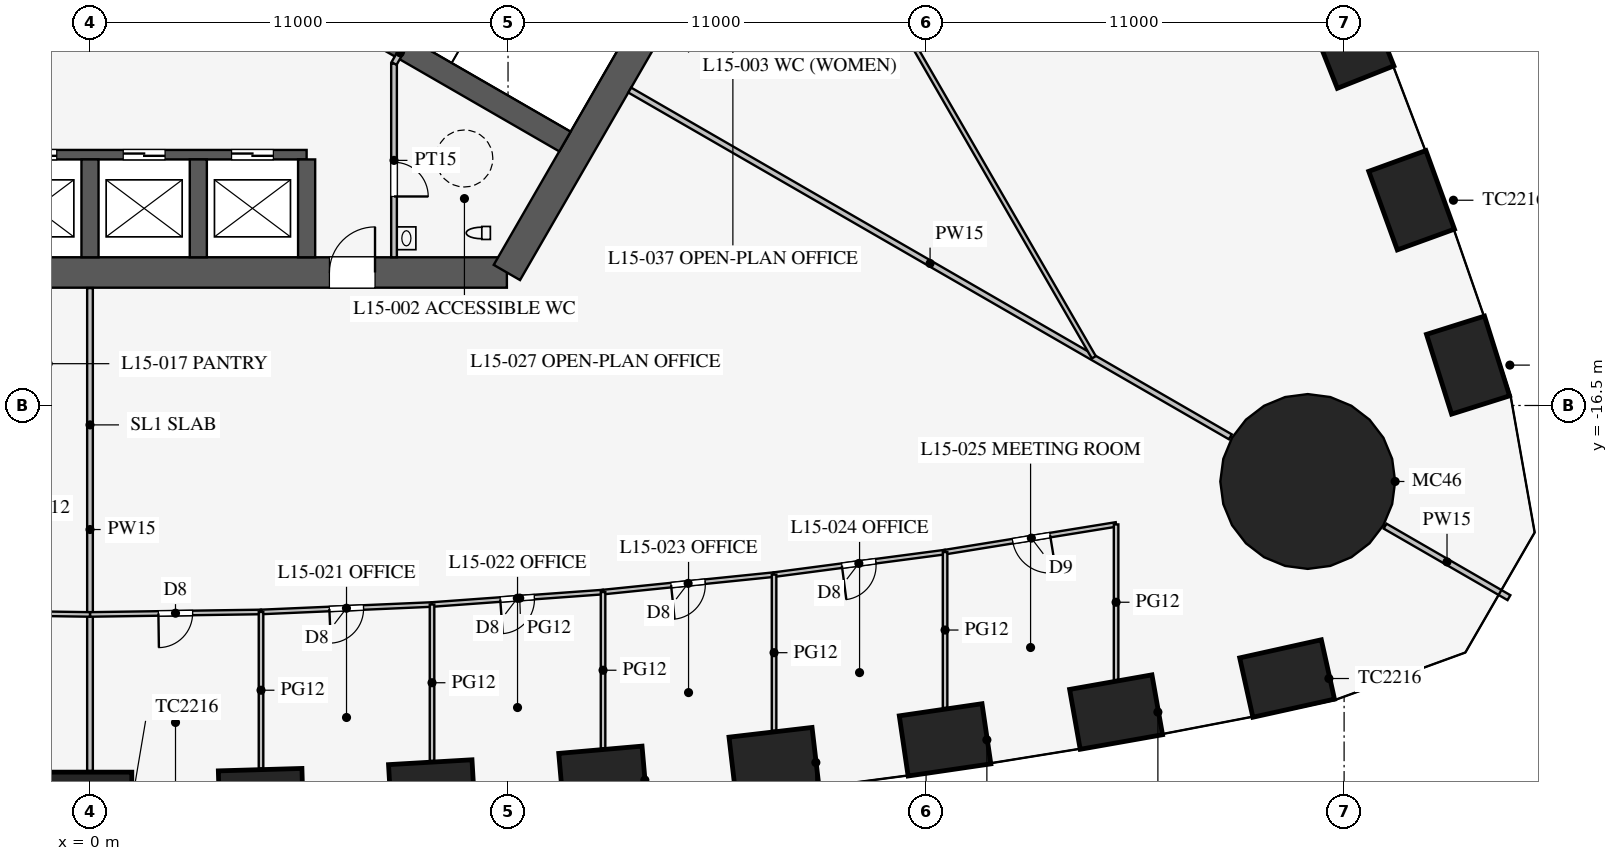
"""IFC4 building model, lengths in metres.
Left out: names, types, materials, properties, quantities, classifications, styles, units other than length and angle.
Written with IfcOpenShell. Run it as: python <this file> out.ifc"""

import sys

from ifc_helpers import new_model, si_unit, direction, frame, frame_2d, origin, origin_2d, place, context, subcontext, project, spatial, rectangle, circle, extrude, element, fill, save


model = new_model("IFC4")
c1 = context("Model", 3, precision=1e-05, world=origin(), true_north=direction((0.0, 1.0)))
c2 = subcontext(c1, "Body", "Model", "MODEL_VIEW")
j1 = project(units=[si_unit("LENGTHUNIT", "METRE"), si_unit("PLANEANGLEUNIT", "RADIAN")], contexts=[c1])
p1 = place(None, origin())
s1 = spatial("IfcSite", under=j1, at=p1, CompositionType="ELEMENT")
p2 = place(p1, origin())
s2 = spatial("IfcBuilding", under=s1, at=p2, CompositionType="ELEMENT")
p3 = place(p2, frame((0.0, 0.0, 66.9)))
s3 = spatial("IfcBuildingStorey", under=s2, at=p3, CompositionType="ELEMENT", Elevation=66.9)
for number, where, z_axis, x_axis in (
    (1, (0.0, -26.949, 0.0), (0.0, 0.0, 1.0), (1.0, 0.0, 0.0)),
    (2, (4.5, -26.883, 0.0), (0.0, 0.0, 1.0), (1.0, 0.029, 0.0)),
    (3, (9.0, -26.686, 0.0), (0.0, 0.0, 1.0), (0.998, 0.058, 0.0)),
    (4, (13.5, -26.357, 0.0), (0.0, 0.0, 1.0), (0.996, 0.087, 0.0)),
    (5, (18.0, -25.895, 0.0), (0.0, 0.0, 1.0), (0.993, 0.116, 0.0)),
    (6, (22.5, -25.299, 0.0), (0.0, 0.0, 1.0), (0.989, 0.145, 0.0)),
    (7, (27.0, -24.568, 0.0), (0.0, 0.0, 1.0), (0.985, 0.174, 0.0)),
    (8, (31.5, -23.685, 0.0), (0.0, 0.0, 1.0), (0.976, 0.217, 0.0)),
    (9, (36.262, -15.438, 0.0), (0.0, 0.0, 1.0), (-0.3, 0.954, 0.0)),
    (10, (34.776, -11.099, 0.0), (0.0, 0.0, 1.0), (-0.342, 0.94, 0.0)),
    (11, (33.16, -6.836, 0.0), (0.0, 0.0, 1.0), (-0.369, 0.929, 0.0)),
):
    element("IfcColumn", number, at=place(p3, frame(where, z_axis=z_axis, x_axis=x_axis)), inside=s3, PredefinedType="COLUMN", context=c2, shape_type="SweptSolid", body=[
        extrude(rectangle(XDim=2.2, YDim=1.6, at=origin_2d()), origin(), (0.0, 0.0, 1.0), 4.2),
    ])
p4 = place(p3, frame((32.043, -18.5, 0.0), z_axis=(0.0, 0.0, 1.0), x_axis=(1.0, 0.0, 0.0)))
e12 = element("IfcColumn", 12, at=p4, inside=s3, PredefinedType="COLUMN", context=c2, shape_type="SweptSolid", body=[
    extrude(circle(Radius=2.3, at=origin_2d()), origin(), (0.0, 0.0, 1.0), 4.2),
])
p5 = place(p3, frame((-10.97, -13.0, 0.0), z_axis=(0.0, 0.0, 1.0), x_axis=(1.0, 0.0, 0.0)))
e13 = element("IfcWall", 13, at=p5, inside=s3, PredefinedType="SHEAR", context=c2, shape_type="SweptSolid", body=[
    extrude(rectangle(XDim=21.939, YDim=0.8, at=frame_2d((10.97, 0.0))), origin(), (0.0, 0.0, 1.0), 4.2),
])
p6 = place(p5, frame((17.27, 0.0, 0.0)))
e14 = element("IfcOpeningElement", 14, at=p6, cuts=e13, PredefinedType="OPENING", context=c2, shape_type="SweptSolid", body=[
    extrude(rectangle(XDim=1.2, YDim=2.1, at=frame_2d((0.6, 1.05))), frame((0.0, 0.41, 0.0), z_axis=(0.0, -1.0, 0.0), x_axis=(1.0, 0.0, 0.0)), (0.0, 0.0, 1.0), 0.82),
])
p7 = place(p5, frame((3.47, 0.0, 0.0)))
e15 = element("IfcOpeningElement", 15, at=p7, cuts=e13, PredefinedType="OPENING", context=c2, shape_type="SweptSolid", body=[
    extrude(rectangle(XDim=1.2, YDim=2.1, at=frame_2d((0.6, 1.05))), frame((0.0, 0.41, 0.0), z_axis=(0.0, -1.0, 0.0), x_axis=(1.0, 0.0, 0.0)), (0.0, 0.0, 1.0), 0.82),
])
p8 = place(p3, frame((10.97, -13.0, 0.0), z_axis=(0.0, 0.0, 1.0), x_axis=(0.499995765644, 0.866027848477, 0.0)))
e16 = element("IfcWall", 16, at=p8, inside=s3, PredefinedType="SHEAR", context=c2, shape_type="SweptSolid", body=[
    extrude(rectangle(XDim=11.547, YDim=0.8, at=frame_2d((5.773, 0.0))), origin(), (0.0, 0.0, 1.0), 4.2),
])
p9 = place(p3, frame((-5.7, -9.9, 0.0), z_axis=(0.0, 0.0, 1.0), x_axis=(1.0, 0.0, 0.0)))
e17 = element("IfcWall", 17, at=p9, inside=s3, PredefinedType="SHEAR", context=c2, shape_type="SweptSolid", body=[
    extrude(rectangle(XDim=11.4, YDim=0.25, at=frame_2d((5.7, 0.0))), origin(), (0.0, 0.0, 1.0), 4.2),
])
p10 = place(p9, frame((0.875, 0.0, 0.0)))
e18 = element("IfcOpeningElement", 18, at=p10, cuts=e17, PredefinedType="OPENING", context=c2, shape_type="SweptSolid", body=[
    extrude(rectangle(XDim=1.1, YDim=2.2, at=frame_2d((0.55, 1.1))), frame((0.0, 0.135, 0.0), z_axis=(0.0, -1.0, 0.0), x_axis=(1.0, 0.0, 0.0)), (0.0, 0.0, 1.0), 0.27),
])
p11 = place(p9, frame((3.725, 0.0, 0.0)))
e19 = element("IfcOpeningElement", 19, at=p11, cuts=e17, PredefinedType="OPENING", context=c2, shape_type="SweptSolid", body=[
    extrude(rectangle(XDim=1.1, YDim=2.2, at=frame_2d((0.55, 1.1))), frame((0.0, 0.135, 0.0), z_axis=(0.0, -1.0, 0.0), x_axis=(1.0, 0.0, 0.0)), (0.0, 0.0, 1.0), 0.27),
])
p12 = place(p9, frame((6.575, 0.0, 0.0)))
e20 = element("IfcOpeningElement", 20, at=p12, cuts=e17, PredefinedType="OPENING", context=c2, shape_type="SweptSolid", body=[
    extrude(rectangle(XDim=1.1, YDim=2.2, at=frame_2d((0.55, 1.1))), frame((0.0, 0.135, 0.0), z_axis=(0.0, -1.0, 0.0), x_axis=(1.0, 0.0, 0.0)), (0.0, 0.0, 1.0), 0.27),
])
p13 = place(p9, frame((9.425, 0.0, 0.0)))
e21 = element("IfcOpeningElement", 21, at=p13, cuts=e17, PredefinedType="OPENING", context=c2, shape_type="SweptSolid", body=[
    extrude(rectangle(XDim=1.1, YDim=2.2, at=frame_2d((0.55, 1.1))), frame((0.0, 0.135, 0.0), z_axis=(0.0, -1.0, 0.0), x_axis=(1.0, 0.0, 0.0)), (0.0, 0.0, 1.0), 0.27),
])
for number, where, z_axis, x_axis in (
    (22, (0.0, -10.025, 0.0), (0.0, 0.0, 1.0), (0.0, -1.0, 0.0)),
    (23, (2.85, -10.025, 0.0), (0.0, 0.0, 1.0), (0.0, -1.0, 0.0)),
    (24, (5.7, -10.025, 0.0), (0.0, 0.0, 1.0), (0.0, -1.0, 0.0)),
):
    element("IfcWall", number, at=place(p3, frame(where, z_axis=z_axis, x_axis=x_axis)), inside=s3, PredefinedType="SHEAR", context=c2, shape_type="SweptSolid", body=[
        extrude(rectangle(XDim=2.575, YDim=0.45, at=frame_2d((1.288, 0.0))), origin(), (0.0, 0.0, 1.0), 4.2),
    ])
p14 = place(p3, frame((4.638, -5.016, 0.0), z_axis=(0.0, 0.0, 1.0), x_axis=(0.866019375473, -0.500010441196, 0.0)))
e25 = element("IfcWall", 25, at=p14, inside=s3, PredefinedType="SHEAR", context=c2, shape_type="SweptSolid", body=[
    extrude(rectangle(XDim=9.075, YDim=0.6, at=frame_2d((4.538, 0.0))), origin(), (0.0, 0.0, 1.0), 4.2),
])
p15 = place(p3, frame((8.0, -7.5, 0.0), z_axis=(0.0, 0.0, 1.0), x_axis=(0.0, -1.0, 0.0)))
e26 = element("IfcWall", 26, at=p15, inside=s3, PredefinedType="PARTITIONING", context=c2, shape_type="SweptSolid", body=[
    extrude(rectangle(XDim=5.1, YDim=0.15, at=frame_2d((2.55, 0.0))), origin(), (0.0, 0.0, 1.0), 4.0),
])
p16 = place(p15, frame((2.6, 0.0, 0.0)))
e27 = element("IfcOpeningElement", 27, at=p16, cuts=e26, PredefinedType="OPENING", context=c2, shape_type="SweptSolid", body=[
    extrude(rectangle(XDim=0.9, YDim=2.1, at=frame_2d((0.45, 1.05))), frame((0.0, 0.085, 0.0), z_axis=(0.0, -1.0, 0.0), x_axis=(1.0, 0.0, 0.0)), (0.0, 0.0, 1.0), 0.17),
])
p17 = place(p3, frame((8.0, -7.5, 0.0), z_axis=(0.0, 0.0, 1.0), x_axis=(0.499842556608, 0.866116284689, 0.0)))
e28 = element("IfcWall", 28, at=p17, inside=s3, PredefinedType="PARTITIONING", context=c2, shape_type="SweptSolid", body=[
    extrude(rectangle(XDim=0.645, YDim=0.15, at=frame_2d((0.323, 0.0))), origin(), (0.0, 0.0, 1.0), 4.0),
])
p18 = place(p3, frame((14.203, -8.2, 0.0), z_axis=(0.0, 0.0, 1.0), x_axis=(0.866024965723, -0.500000758745, 0.0)))
e29 = element("IfcWall", 29, at=p18, inside=s3, PredefinedType="PARTITIONING", context=c2, shape_type="SweptSolid", body=[
    extrude(rectangle(XDim=18.25, YDim=0.15, at=frame_2d((9.125, 0.0))), origin(), (0.0, 0.0, 1.0), 2.3),
])
p19 = place(p3, frame((34.078, -19.675, 0.0), z_axis=(0.0, 0.0, 1.0), x_axis=(0.866019247219, -0.500010663332, 0.0)))
e30 = element("IfcWall", 30, at=p19, inside=s3, PredefinedType="PARTITIONING", context=c2, shape_type="SweptSolid", body=[
    extrude(rectangle(XDim=3.764, YDim=0.15, at=frame_2d((1.882, 0.0))), origin(), (0.0, 0.0, 1.0), 2.3),
])
p20 = place(p3, frame((0.0, -13.41, 0.0), z_axis=(0.0, 0.0, 1.0), x_axis=(0.0, -1.0, 0.0)))
e31 = element("IfcWall", 31, at=p20, inside=s3, PredefinedType="PARTITIONING", context=c2, shape_type="SweptSolid", body=[
    extrude(rectangle(XDim=12.709, YDim=0.15, at=frame_2d((6.354, 0.0))), origin(), (0.0, 0.0, 1.0), 2.8),
])
p21 = place(p3, frame((0.0, -21.999, 0.0), z_axis=(0.0, 0.0, 1.0), x_axis=(0.999894311967, 0.014538393859, 0.0)))
e32 = element("IfcWall", 32, at=p21, inside=s3, PredefinedType="PARTITIONING", context=c2, shape_type="SweptSolid", body=[
    extrude(rectangle(XDim=4.5, YDim=0.12, at=frame_2d((2.25, 0.0))), origin(), (0.0, 0.0, 1.0), 2.9),
])
p22 = place(p21, frame((1.8, 0.0, 0.15)))
e33 = element("IfcOpeningElement", 33, at=p22, cuts=e32, PredefinedType="OPENING", context=c2, shape_type="SweptSolid", body=[
    extrude(rectangle(XDim=0.9, YDim=2.1, at=frame_2d((0.45, 1.05))), frame((0.0, 0.07, 0.0), z_axis=(0.0, -1.0, 0.0), x_axis=(1.0, 0.0, 0.0)), (0.0, 0.0, 1.0), 0.14),
])
p23 = place(p3, frame((13.5, -21.41, 0.0), z_axis=(0.0, 0.0, 1.0), x_axis=(0.994833141332, 0.101523499286, 0.0)))
e34 = element("IfcWall", 34, at=p23, inside=s3, PredefinedType="PARTITIONING", context=c2, shape_type="SweptSolid", body=[
    extrude(rectangle(XDim=4.523, YDim=0.12, at=frame_2d((2.262, 0.0))), origin(), (0.0, 0.0, 1.0), 2.9),
])
p24 = place(p23, frame((1.8, 0.0, 0.15)))
e35 = element("IfcOpeningElement", 35, at=p24, cuts=e34, PredefinedType="OPENING", context=c2, shape_type="SweptSolid", body=[
    extrude(rectangle(XDim=0.9, YDim=2.1, at=frame_2d((0.45, 1.05))), frame((0.0, 0.07, 0.0), z_axis=(0.0, -1.0, 0.0), x_axis=(1.0, 0.0, 0.0)), (0.0, 0.0, 1.0), 0.14),
])
p25 = place(p3, frame((18.0, -20.951, 0.0), z_axis=(0.0, 0.0, 1.0), x_axis=(0.991435244698, 0.130599217346, 0.0)))
e36 = element("IfcWall", 36, at=p25, inside=s3, PredefinedType="PARTITIONING", context=c2, shape_type="SweptSolid", body=[
    extrude(rectangle(XDim=4.539, YDim=0.12, at=frame_2d((2.27, 0.0))), origin(), (0.0, 0.0, 1.0), 2.9),
])
p26 = place(p25, frame((1.8, 0.0, 0.15)))
e37 = element("IfcOpeningElement", 37, at=p26, cuts=e36, PredefinedType="OPENING", context=c2, shape_type="SweptSolid", body=[
    extrude(rectangle(XDim=0.9, YDim=2.1, at=frame_2d((0.45, 1.05))), frame((0.0, 0.07, 0.0), z_axis=(0.0, -1.0, 0.0), x_axis=(1.0, 0.0, 0.0)), (0.0, 0.0, 1.0), 0.14),
])
p27 = place(p3, frame((22.5, -20.358, 0.0), z_axis=(0.0, 0.0, 1.0), x_axis=(0.987181300889, 0.159602879593, 0.0)))
e38 = element("IfcWall", 38, at=p27, inside=s3, PredefinedType="PARTITIONING", context=c2, shape_type="SweptSolid", body=[
    extrude(rectangle(XDim=4.558, YDim=0.12, at=frame_2d((2.279, 0.0))), origin(), (0.0, 0.0, 1.0), 2.9),
])
p28 = place(p27, frame((1.8, 0.0, 0.15)))
e39 = element("IfcOpeningElement", 39, at=p28, cuts=e38, PredefinedType="OPENING", context=c2, shape_type="SweptSolid", body=[
    extrude(rectangle(XDim=1.0, YDim=2.1, at=frame_2d((0.5, 1.05))), frame((0.0, 0.07, 0.0), z_axis=(0.0, -1.0, 0.0), x_axis=(1.0, 0.0, 0.0)), (0.0, 0.0, 1.0), 0.14),
])
p29 = place(p3, frame((4.5, -21.933, 0.0), z_axis=(0.0, 0.0, 1.0), x_axis=(0.999052370647, 0.043524254212, 0.0)))
e40 = element("IfcWall", 40, at=p29, inside=s3, PredefinedType="PARTITIONING", context=c2, shape_type="SweptSolid", body=[
    extrude(rectangle(XDim=4.504, YDim=0.12, at=frame_2d((2.252, 0.0))), origin(), (0.0, 0.0, 1.0), 2.9),
])
p30 = place(p29, frame((1.8, 0.0, 0.15)))
e41 = element("IfcOpeningElement", 41, at=p30, cuts=e40, PredefinedType="OPENING", context=c2, shape_type="SweptSolid", body=[
    extrude(rectangle(XDim=0.9, YDim=2.1, at=frame_2d((0.45, 1.05))), frame((0.0, 0.07, 0.0), z_axis=(0.0, -1.0, 0.0), x_axis=(1.0, 0.0, 0.0)), (0.0, 0.0, 1.0), 0.14),
])
p31 = place(p3, frame((9.0, -21.737, 0.0), z_axis=(0.0, 0.0, 1.0), x_axis=(0.997363894896, 0.072562119306, 0.0)))
e42 = element("IfcWall", 42, at=p31, inside=s3, PredefinedType="PARTITIONING", context=c2, shape_type="SweptSolid", body=[
    extrude(rectangle(XDim=4.512, YDim=0.12, at=frame_2d((2.256, 0.0))), origin(), (0.0, 0.0, 1.0), 2.9),
])
p32 = place(p31, frame((1.8, 0.0, 0.15)))
e43 = element("IfcOpeningElement", 43, at=p32, cuts=e42, PredefinedType="OPENING", context=c2, shape_type="SweptSolid", body=[
    extrude(rectangle(XDim=0.9, YDim=2.1, at=frame_2d((0.45, 1.05))), frame((0.0, 0.07, 0.0), z_axis=(0.0, -1.0, 0.0), x_axis=(1.0, 0.0, 0.0)), (0.0, 0.0, 1.0), 0.14),
])
p33 = place(p3, frame((-4.5, -21.933, 0.0), z_axis=(0.0, 0.0, 1.0), x_axis=(0.999894311967, -0.014538393859, 0.0)))
e44 = element("IfcWall", 44, at=p33, inside=s3, PredefinedType="PARTITIONING", context=c2, shape_type="SweptSolid", body=[
    extrude(rectangle(XDim=4.5, YDim=0.12, at=frame_2d((2.25, 0.0))), origin(), (0.0, 0.0, 1.0), 2.9),
])
p34 = place(p33, frame((1.8, 0.0, 0.15)))
e45 = element("IfcOpeningElement", 45, at=p34, cuts=e44, PredefinedType="OPENING", context=c2, shape_type="SweptSolid", body=[
    extrude(rectangle(XDim=0.9, YDim=2.1, at=frame_2d((0.45, 1.05))), frame((0.0, 0.07, 0.0), z_axis=(0.0, -1.0, 0.0), x_axis=(1.0, 0.0, 0.0)), (0.0, 0.0, 1.0), 0.14),
])
p35 = place(p3, frame((13.5, -21.41, 0.0), z_axis=(0.0, 0.0, 1.0), x_axis=(0.0, -1.0, 0.0)))
e46 = element("IfcWall", 46, at=p35, inside=s3, PredefinedType="PARTITIONING", context=c2, shape_type="SweptSolid", body=[
    extrude(rectangle(XDim=4.114, YDim=0.12, at=frame_2d((2.057, 0.0))), origin(), (0.0, 0.0, 1.0), 2.6),
])
p36 = place(p3, frame((18.0, -20.951, 0.0), z_axis=(0.0, 0.0, 1.0), x_axis=(0.0, -1.0, 0.0)))
e47 = element("IfcWall", 47, at=p36, inside=s3, PredefinedType="PARTITIONING", context=c2, shape_type="SweptSolid", body=[
    extrude(rectangle(XDim=4.109, YDim=0.12, at=frame_2d((2.054, 0.0))), origin(), (0.0, 0.0, 1.0), 2.6),
])
p37 = place(p3, frame((22.5, -20.358, 0.0), z_axis=(0.0, 0.0, 1.0), x_axis=(0.0, -1.0, 0.0)))
e48 = element("IfcWall", 48, at=p37, inside=s3, PredefinedType="PARTITIONING", context=c2, shape_type="SweptSolid", body=[
    extrude(rectangle(XDim=4.103, YDim=0.12, at=frame_2d((2.051, 0.0))), origin(), (0.0, 0.0, 1.0), 2.8),
])
p38 = place(p3, frame((27.0, -19.63, 0.0), z_axis=(0.0, 0.0, 1.0), x_axis=(0.0, -1.0, 0.0)))
e49 = element("IfcWall", 49, at=p38, inside=s3, PredefinedType="PARTITIONING", context=c2, shape_type="SweptSolid", body=[
    extrude(rectangle(XDim=4.095, YDim=0.12, at=frame_2d((2.047, 0.0))), origin(), (0.0, 0.0, 1.0), 2.9),
])
p39 = place(p3, frame((4.5, -21.933, 0.0), z_axis=(0.0, 0.0, 1.0), x_axis=(0.0, -1.0, 0.0)))
e50 = element("IfcWall", 50, at=p39, inside=s3, PredefinedType="PARTITIONING", context=c2, shape_type="SweptSolid", body=[
    extrude(rectangle(XDim=4.119, YDim=0.12, at=frame_2d((2.06, 0.0))), origin(), (0.0, 0.0, 1.0), 2.8),
])
p40 = place(p3, frame((9.0, -21.737, 0.0), z_axis=(0.0, 0.0, 1.0), x_axis=(0.0, -1.0, 0.0)))
e51 = element("IfcWall", 51, at=p40, inside=s3, PredefinedType="PARTITIONING", context=c2, shape_type="SweptSolid", body=[
    extrude(rectangle(XDim=4.117, YDim=0.12, at=frame_2d((2.059, 0.0))), origin(), (0.0, 0.0, 1.0), 2.8),
])
p41 = place(p3, frame((26.415, -15.231, 0.0), z_axis=(0.0, 0.0, 1.0), x_axis=(-0.50000091641, 0.866024874695, 0.0)))
e52 = element("IfcWall", 52, at=p41, inside=s3, PredefinedType="PARTITIONING", context=c2, shape_type="SweptSolid", body=[
    extrude(rectangle(XDim=52.796, YDim=0.12, at=frame_2d((26.398, 0.0))), origin(), (0.0, 0.0, 1.0), 2.9),
])
p42 = place(p41, frame((10.2, 0.0, 0.15)))
e53 = element("IfcOpeningElement", 53, at=p42, cuts=e52, PredefinedType="OPENING", context=c2, shape_type="SweptSolid", body=[
    extrude(rectangle(XDim=1.8, YDim=2.1, at=frame_2d((0.9, 1.05))), frame((0.0, 0.07, 0.0), z_axis=(0.0, -1.0, 0.0), x_axis=(1.0, 0.0, 0.0)), (0.0, 0.0, 1.0), 0.14),
])
p43 = place(p41, frame((40.8, 0.0, 0.15)))
e54 = element("IfcOpeningElement", 54, at=p43, cuts=e52, PredefinedType="OPENING", context=c2, shape_type="SweptSolid", body=[
    extrude(rectangle(XDim=1.8, YDim=2.1, at=frame_2d((0.9, 1.05))), frame((0.0, 0.07, 0.0), z_axis=(0.0, -1.0, 0.0), x_axis=(1.0, 0.0, 0.0)), (0.0, 0.0, 1.0), 0.14),
])
p44 = place(p16, origin())
e55 = element("IfcDoor", 55, at=p44, inside=s3, OperationType="SINGLE_SWING_RIGHT", PredefinedType="DOOR", context=c2, shape_type="SweptSolid", body=[
    extrude(rectangle(XDim=0.9, YDim=2.1, at=frame_2d((0.45, 1.05))), frame((0.0, 0.025, 0.0), z_axis=(0.0, -1.0, 0.0), x_axis=(1.0, 0.0, 0.0)), (0.0, 0.0, 1.0), 0.05),
])
fill(e27, e55)
p45 = place(p6, origin())
e56 = element("IfcDoor", 56, at=p45, inside=s3, OperationType="SINGLE_SWING_RIGHT", PredefinedType="DOOR", context=c2, shape_type="SweptSolid", body=[
    extrude(rectangle(XDim=1.2, YDim=2.1, at=frame_2d((0.6, 1.05))), frame((0.0, 0.025, 0.0), z_axis=(0.0, -1.0, 0.0), x_axis=(1.0, 0.0, 0.0)), (0.0, 0.0, 1.0), 0.05),
])
fill(e14, e56)
p46 = place(p22, frame((0.9, 0.0, 0.0), z_axis=(0.0, 0.0, 1.0), x_axis=(-1.0, 0.0, 0.0)))
e57 = element("IfcDoor", 57, at=p46, inside=s3, OperationType="SINGLE_SWING_RIGHT", PredefinedType="DOOR", context=c2, shape_type="SweptSolid", body=[
    extrude(rectangle(XDim=0.9, YDim=2.1, at=frame_2d((0.45, 1.05))), frame((0.0, 0.025, 0.0), z_axis=(0.0, -1.0, 0.0), x_axis=(1.0, 0.0, 0.0)), (0.0, 0.0, 1.0), 0.05),
])
fill(e33, e57)
p47 = place(p30, frame((0.9, 0.0, 0.0), z_axis=(0.0, 0.0, 1.0), x_axis=(-1.0, 0.0, 0.0)))
e58 = element("IfcDoor", 58, at=p47, inside=s3, OperationType="SINGLE_SWING_RIGHT", PredefinedType="DOOR", context=c2, shape_type="SweptSolid", body=[
    extrude(rectangle(XDim=0.9, YDim=2.1, at=frame_2d((0.45, 1.05))), frame((0.0, 0.025, 0.0), z_axis=(0.0, -1.0, 0.0), x_axis=(1.0, 0.0, 0.0)), (0.0, 0.0, 1.0), 0.05),
])
fill(e41, e58)
p48 = place(p32, frame((0.9, 0.0, 0.0), z_axis=(0.0, 0.0, 1.0), x_axis=(-1.0, 0.0, 0.0)))
e59 = element("IfcDoor", 59, at=p48, inside=s3, OperationType="SINGLE_SWING_RIGHT", PredefinedType="DOOR", context=c2, shape_type="SweptSolid", body=[
    extrude(rectangle(XDim=0.9, YDim=2.1, at=frame_2d((0.45, 1.05))), frame((0.0, 0.025, 0.0), z_axis=(0.0, -1.0, 0.0), x_axis=(1.0, 0.0, 0.0)), (0.0, 0.0, 1.0), 0.05),
])
fill(e43, e59)
p49 = place(p24, frame((0.9, 0.0, 0.0), z_axis=(0.0, 0.0, 1.0), x_axis=(-1.0, 0.0, 0.0)))
e60 = element("IfcDoor", 60, at=p49, inside=s3, OperationType="SINGLE_SWING_RIGHT", PredefinedType="DOOR", context=c2, shape_type="SweptSolid", body=[
    extrude(rectangle(XDim=0.9, YDim=2.1, at=frame_2d((0.45, 1.05))), frame((0.0, 0.025, 0.0), z_axis=(0.0, -1.0, 0.0), x_axis=(1.0, 0.0, 0.0)), (0.0, 0.0, 1.0), 0.05),
])
fill(e35, e60)
p50 = place(p26, frame((0.9, 0.0, 0.0), z_axis=(0.0, 0.0, 1.0), x_axis=(-1.0, 0.0, 0.0)))
e61 = element("IfcDoor", 61, at=p50, inside=s3, OperationType="SINGLE_SWING_RIGHT", PredefinedType="DOOR", context=c2, shape_type="SweptSolid", body=[
    extrude(rectangle(XDim=0.9, YDim=2.1, at=frame_2d((0.45, 1.05))), frame((0.0, 0.025, 0.0), z_axis=(0.0, -1.0, 0.0), x_axis=(1.0, 0.0, 0.0)), (0.0, 0.0, 1.0), 0.05),
])
fill(e37, e61)
p51 = place(p28, frame((1.0, 0.0, 0.0), z_axis=(0.0, 0.0, 1.0), x_axis=(-1.0, 0.0, 0.0)))
e62 = element("IfcDoor", 62, at=p51, inside=s3, OperationType="SINGLE_SWING_LEFT", PredefinedType="DOOR", context=c2, shape_type="SweptSolid", body=[
    extrude(rectangle(XDim=1.0, YDim=2.1, at=frame_2d((0.5, 1.05))), frame((0.0, 0.025, 0.0), z_axis=(0.0, -1.0, 0.0), x_axis=(1.0, 0.0, 0.0)), (0.0, 0.0, 1.0), 0.05),
])
fill(e39, e62)
p52 = place(p11, origin())
e63 = element("IfcDoor", 63, at=p52, inside=s3, OperationType="DOUBLE_DOOR_SLIDING", PredefinedType="DOOR", context=c2, shape_type="SweptSolid", body=[
    extrude(rectangle(XDim=1.1, YDim=2.2, at=frame_2d((0.55, 1.1))), frame((0.0, 0.025, 0.0), z_axis=(0.0, -1.0, 0.0), x_axis=(1.0, 0.0, 0.0)), (0.0, 0.0, 1.0), 0.05),
])
fill(e19, e63)
p53 = place(p12, origin())
e64 = element("IfcDoor", 64, at=p53, inside=s3, OperationType="DOUBLE_DOOR_SLIDING", PredefinedType="DOOR", context=c2, shape_type="SweptSolid", body=[
    extrude(rectangle(XDim=1.1, YDim=2.2, at=frame_2d((0.55, 1.1))), frame((0.0, 0.025, 0.0), z_axis=(0.0, -1.0, 0.0), x_axis=(1.0, 0.0, 0.0)), (0.0, 0.0, 1.0), 0.05),
])
fill(e20, e64)
p54 = place(p13, origin())
e65 = element("IfcDoor", 65, at=p54, inside=s3, OperationType="DOUBLE_DOOR_SLIDING", PredefinedType="DOOR", context=c2, shape_type="SweptSolid", body=[
    extrude(rectangle(XDim=1.1, YDim=2.2, at=frame_2d((0.55, 1.1))), frame((0.0, 0.025, 0.0), z_axis=(0.0, -1.0, 0.0), x_axis=(1.0, 0.0, 0.0)), (0.0, 0.0, 1.0), 0.05),
])
fill(e21, e65)
save(model, sys.argv[1])
